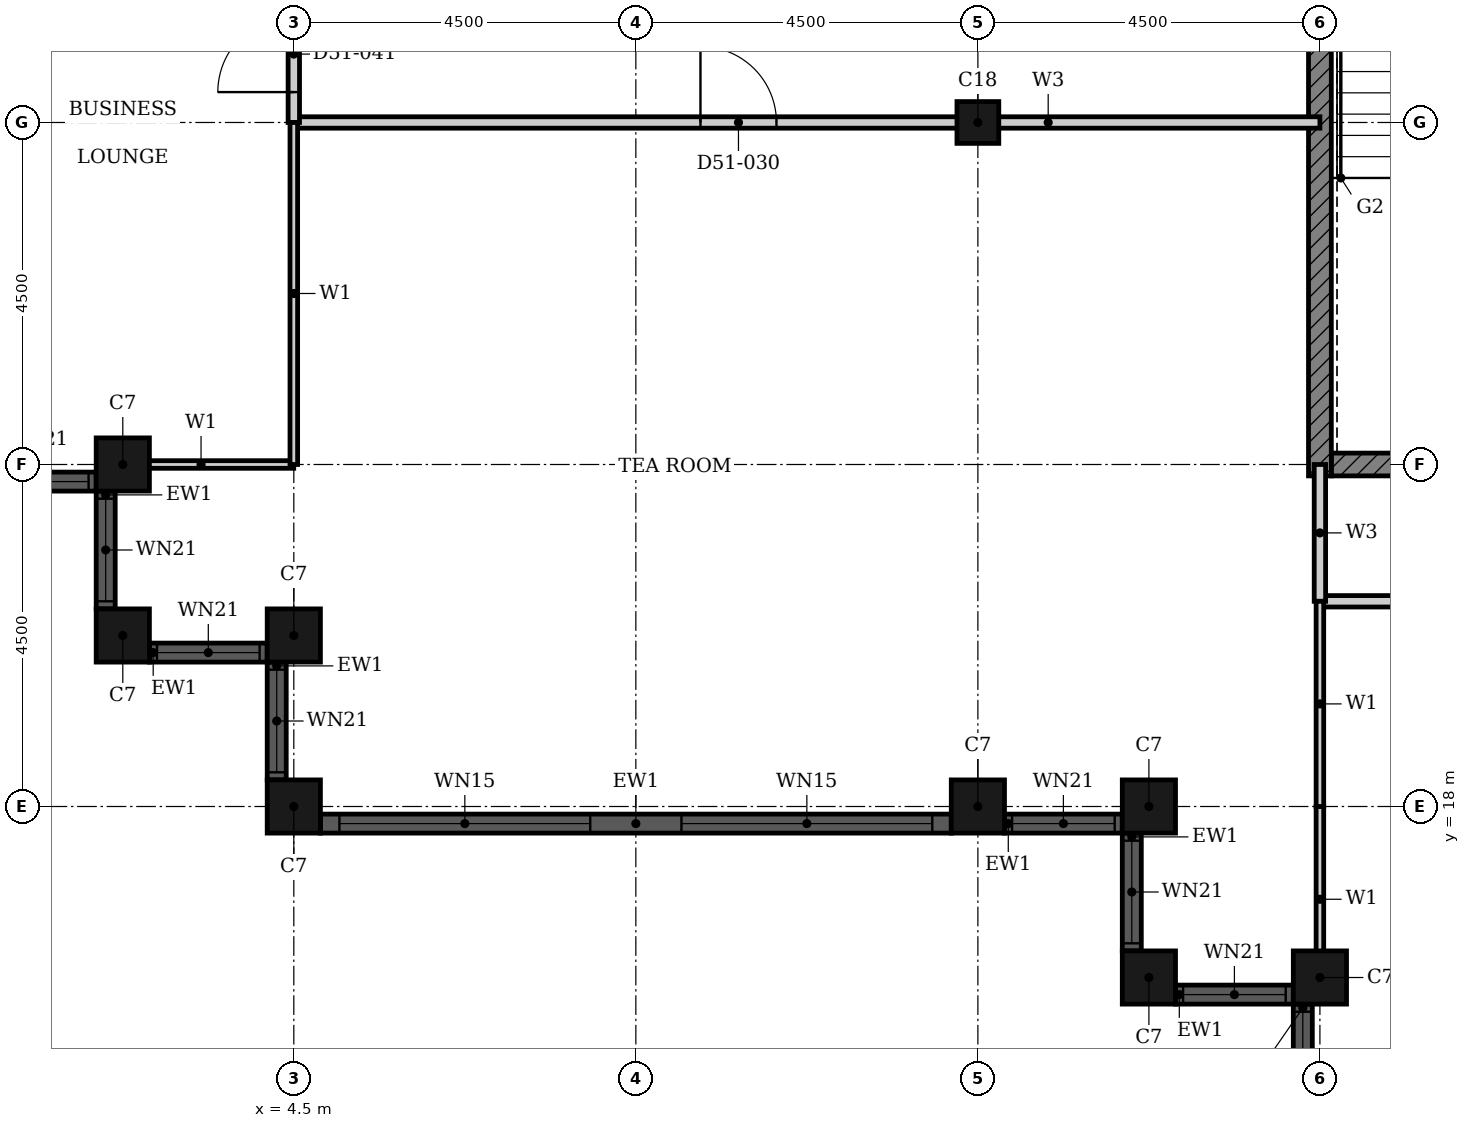
"""IFC4 building model, lengths in metres.
Left out: names, types, materials, properties, quantities, classifications, styles, units other than length and angle.
Written with IfcOpenShell. Run it as: python <this file> out.ifc"""

import sys

from ifc_helpers import new_model, si_unit, direction, frame, frame_2d, origin, origin_2d, place, context, subcontext, project, spatial, rectangle, hollow_rectangle, extrude, element, fill, save


model = new_model("IFC4")
c1 = context("Model", 3, precision=1e-05, world=origin(), true_north=direction((0.0, 1.0)))
c2 = subcontext(c1, "Body", "Model", "MODEL_VIEW")
j1 = project(units=[si_unit("LENGTHUNIT", "METRE"), si_unit("PLANEANGLEUNIT", "RADIAN")], contexts=[c1])
p1 = place(None, origin())
s1 = spatial("IfcSite", under=j1, at=p1, CompositionType="ELEMENT")
p2 = place(p1, origin())
s2 = spatial("IfcBuilding", under=s1, at=p2, CompositionType="ELEMENT")
p3 = place(p2, frame((0.0, 0.0, 203.5)))
s3 = spatial("IfcBuildingStorey", under=s2, at=p3, CompositionType="ELEMENT", Elevation=203.5)
for number, where, z_axis, x_axis in (
    (1, (2.25, 22.5, 0.0), (0.0, 0.0, 1.0), (1.0, 0.0, 0.0)),
    (2, (2.25, 20.25, 0.0), (0.0, 0.0, 1.0), (1.0, 0.0, 0.0)),
    (3, (4.5, 20.25, 0.0), (0.0, 0.0, 1.0), (1.0, 0.0, 0.0)),
    (4, (4.5, 18.0, 0.0), (0.0, 0.0, 1.0), (1.0, 0.0, 0.0)),
    (5, (13.5, 18.0, 0.0), (0.0, 0.0, 1.0), (1.0, 0.0, 0.0)),
    (6, (15.75, 18.0, 0.0), (0.0, 0.0, 1.0), (1.0, 0.0, 0.0)),
    (7, (15.75, 15.75, 0.0), (0.0, 0.0, 1.0), (1.0, 0.0, 0.0)),
    (8, (18.0, 15.75, 0.0), (0.0, 0.0, 1.0), (1.0, 0.0, 0.0)),
):
    element("IfcColumn", number, at=place(p3, frame(where, z_axis=z_axis, x_axis=x_axis)), inside=s3, PredefinedType="COLUMN", context=c2, shape_type="SweptSolid", body=[
        extrude(hollow_rectangle(XDim=0.7, YDim=0.7, WallThickness=0.022, at=origin_2d()), origin(), (0.0, 0.0, 1.0), 3.7),
    ])
p4 = place(p3, frame((13.5, 27.0, 0.0), z_axis=(0.0, 0.0, 1.0), x_axis=(1.0, 0.0, 0.0)))
e9 = element("IfcColumn", 9, at=p4, inside=s3, PredefinedType="COLUMN", context=c2, shape_type="SweptSolid", body=[
    extrude(hollow_rectangle(XDim=0.55, YDim=0.55, WallThickness=0.018, at=origin_2d()), origin(), (0.0, 0.0, 1.0), 3.7),
])
p5 = place(p3, frame((0.35, 22.275, 0.0), z_axis=(0.0, 0.0, 1.0), x_axis=(1.0, 0.0, 0.0)))
e10 = element("IfcWall", 10, at=p5, inside=s3, PredefinedType="SOLIDWALL", context=c2, shape_type="SweptSolid", body=[
    extrude(rectangle(XDim=1.55, YDim=0.25, at=frame_2d((0.775, 0.0))), origin(), (0.0, 0.0, 1.0), 3.7),
])
p6 = place(p5, frame((0.1, 0.0, 0.9)))
e11 = element("IfcOpeningElement", 11, at=p6, cuts=e10, PredefinedType="OPENING", context=c2, shape_type="SweptSolid", body=[
    extrude(rectangle(XDim=1.35, YDim=1.85, at=frame_2d((0.675, 0.925))), frame((0.0, 0.135, 0.0), z_axis=(0.0, -1.0, 0.0), x_axis=(1.0, 0.0, 0.0)), (0.0, 0.0, 1.0), 0.27),
])
p7 = place(p3, frame((2.025, 22.15, 0.0), z_axis=(0.0, 0.0, 1.0), x_axis=(0.0, -1.0, 0.0)))
e12 = element("IfcWall", 12, at=p7, inside=s3, PredefinedType="SOLIDWALL", context=c2, shape_type="SweptSolid", body=[
    extrude(rectangle(XDim=1.55, YDim=0.25, at=frame_2d((0.775, 0.0))), origin(), (0.0, 0.0, 1.0), 3.7),
])
p8 = place(p7, frame((0.1, 0.0, 0.9)))
e13 = element("IfcOpeningElement", 13, at=p8, cuts=e12, PredefinedType="OPENING", context=c2, shape_type="SweptSolid", body=[
    extrude(rectangle(XDim=1.35, YDim=1.85, at=frame_2d((0.675, 0.925))), frame((0.0, 0.135, 0.0), z_axis=(0.0, -1.0, 0.0), x_axis=(1.0, 0.0, 0.0)), (0.0, 0.0, 1.0), 0.27),
])
p9 = place(p3, frame((2.6, 20.025, 0.0), z_axis=(0.0, 0.0, 1.0), x_axis=(1.0, 0.0, 0.0)))
e14 = element("IfcWall", 14, at=p9, inside=s3, PredefinedType="SOLIDWALL", context=c2, shape_type="SweptSolid", body=[
    extrude(rectangle(XDim=1.55, YDim=0.25, at=frame_2d((0.775, 0.0))), origin(), (0.0, 0.0, 1.0), 3.7),
])
p10 = place(p9, frame((0.1, 0.0, 0.9)))
e15 = element("IfcOpeningElement", 15, at=p10, cuts=e14, PredefinedType="OPENING", context=c2, shape_type="SweptSolid", body=[
    extrude(rectangle(XDim=1.35, YDim=1.85, at=frame_2d((0.675, 0.925))), frame((0.0, 0.135, 0.0), z_axis=(0.0, -1.0, 0.0), x_axis=(1.0, 0.0, 0.0)), (0.0, 0.0, 1.0), 0.27),
])
p11 = place(p3, frame((4.275, 19.9, 0.0), z_axis=(0.0, 0.0, 1.0), x_axis=(0.0, -1.0, 0.0)))
e16 = element("IfcWall", 16, at=p11, inside=s3, PredefinedType="SOLIDWALL", context=c2, shape_type="SweptSolid", body=[
    extrude(rectangle(XDim=1.55, YDim=0.25, at=frame_2d((0.775, 0.0))), origin(), (0.0, 0.0, 1.0), 3.7),
])
p12 = place(p11, frame((0.1, 0.0, 0.9)))
e17 = element("IfcOpeningElement", 17, at=p12, cuts=e16, PredefinedType="OPENING", context=c2, shape_type="SweptSolid", body=[
    extrude(rectangle(XDim=1.35, YDim=1.85, at=frame_2d((0.675, 0.925))), frame((0.0, 0.135, 0.0), z_axis=(0.0, -1.0, 0.0), x_axis=(1.0, 0.0, 0.0)), (0.0, 0.0, 1.0), 0.27),
])
p13 = place(p3, frame((4.85, 17.775, 0.0), z_axis=(0.0, 0.0, 1.0), x_axis=(1.0, 0.0, 0.0)))
e18 = element("IfcWall", 18, at=p13, inside=s3, PredefinedType="SOLIDWALL", context=c2, shape_type="SweptSolid", body=[
    extrude(rectangle(XDim=8.3, YDim=0.25, at=frame_2d((4.15, 0.0))), origin(), (0.0, 0.0, 1.0), 3.7),
])
p14 = place(p13, frame((0.25, 0.0, 0.45)))
e19 = element("IfcOpeningElement", 19, at=p14, cuts=e18, PredefinedType="OPENING", context=c2, shape_type="SweptSolid", body=[
    extrude(rectangle(XDim=3.3, YDim=2.3, at=frame_2d((1.65, 1.15))), frame((0.0, 0.135, 0.0), z_axis=(0.0, -1.0, 0.0), x_axis=(1.0, 0.0, 0.0)), (0.0, 0.0, 1.0), 0.27),
])
p15 = place(p13, frame((4.75, 0.0, 0.45)))
e20 = element("IfcOpeningElement", 20, at=p15, cuts=e18, PredefinedType="OPENING", context=c2, shape_type="SweptSolid", body=[
    extrude(rectangle(XDim=3.3, YDim=2.3, at=frame_2d((1.65, 1.15))), frame((0.0, 0.135, 0.0), z_axis=(0.0, -1.0, 0.0), x_axis=(1.0, 0.0, 0.0)), (0.0, 0.0, 1.0), 0.27),
])
p16 = place(p3, frame((13.85, 17.775, 0.0), z_axis=(0.0, 0.0, 1.0), x_axis=(1.0, 0.0, 0.0)))
e21 = element("IfcWall", 21, at=p16, inside=s3, PredefinedType="SOLIDWALL", context=c2, shape_type="SweptSolid", body=[
    extrude(rectangle(XDim=1.55, YDim=0.25, at=frame_2d((0.775, 0.0))), origin(), (0.0, 0.0, 1.0), 3.7),
])
p17 = place(p16, frame((0.1, 0.0, 0.9)))
e22 = element("IfcOpeningElement", 22, at=p17, cuts=e21, PredefinedType="OPENING", context=c2, shape_type="SweptSolid", body=[
    extrude(rectangle(XDim=1.35, YDim=1.85, at=frame_2d((0.675, 0.925))), frame((0.0, 0.135, 0.0), z_axis=(0.0, -1.0, 0.0), x_axis=(1.0, 0.0, 0.0)), (0.0, 0.0, 1.0), 0.27),
])
p18 = place(p3, frame((15.525, 17.65, 0.0), z_axis=(0.0, 0.0, 1.0), x_axis=(0.0, -1.0, 0.0)))
e23 = element("IfcWall", 23, at=p18, inside=s3, PredefinedType="SOLIDWALL", context=c2, shape_type="SweptSolid", body=[
    extrude(rectangle(XDim=1.55, YDim=0.25, at=frame_2d((0.775, 0.0))), origin(), (0.0, 0.0, 1.0), 3.7),
])
p19 = place(p18, frame((0.1, 0.0, 0.9)))
e24 = element("IfcOpeningElement", 24, at=p19, cuts=e23, PredefinedType="OPENING", context=c2, shape_type="SweptSolid", body=[
    extrude(rectangle(XDim=1.35, YDim=1.85, at=frame_2d((0.675, 0.925))), frame((0.0, 0.135, 0.0), z_axis=(0.0, -1.0, 0.0), x_axis=(1.0, 0.0, 0.0)), (0.0, 0.0, 1.0), 0.27),
])
p20 = place(p3, frame((16.1, 15.525, 0.0), z_axis=(0.0, 0.0, 1.0), x_axis=(1.0, 0.0, 0.0)))
e25 = element("IfcWall", 25, at=p20, inside=s3, PredefinedType="SOLIDWALL", context=c2, shape_type="SweptSolid", body=[
    extrude(rectangle(XDim=1.55, YDim=0.25, at=frame_2d((0.775, 0.0))), origin(), (0.0, 0.0, 1.0), 3.7),
])
p21 = place(p20, frame((0.1, 0.0, 0.9)))
e26 = element("IfcOpeningElement", 26, at=p21, cuts=e25, PredefinedType="OPENING", context=c2, shape_type="SweptSolid", body=[
    extrude(rectangle(XDim=1.35, YDim=1.85, at=frame_2d((0.675, 0.925))), frame((0.0, 0.135, 0.0), z_axis=(0.0, -1.0, 0.0), x_axis=(1.0, 0.0, 0.0)), (0.0, 0.0, 1.0), 0.27),
])
p22 = place(p3, frame((17.775, 15.4, 0.0), z_axis=(0.0, 0.0, 1.0), x_axis=(0.0, -1.0, 0.0)))
e27 = element("IfcWall", 27, at=p22, inside=s3, PredefinedType="SOLIDWALL", context=c2, shape_type="SweptSolid", body=[
    extrude(rectangle(XDim=1.55, YDim=0.25, at=frame_2d((0.775, 0.0))), origin(), (0.0, 0.0, 1.0), 3.7),
])
p23 = place(p22, frame((0.1, 0.0, 0.9)))
e28 = element("IfcOpeningElement", 28, at=p23, cuts=e27, PredefinedType="OPENING", context=c2, shape_type="SweptSolid", body=[
    extrude(rectangle(XDim=1.35, YDim=1.85, at=frame_2d((0.675, 0.925))), frame((0.0, 0.135, 0.0), z_axis=(0.0, -1.0, 0.0), x_axis=(1.0, 0.0, 0.0)), (0.0, 0.0, 1.0), 0.27),
])
p24 = place(p3, frame((18.15, 22.5, 0.0), z_axis=(0.0, 0.0, 1.0), x_axis=(1.0, 0.0, 0.0)))
e29 = element("IfcWall", 29, at=p24, inside=s3, PredefinedType="SHEAR", context=c2, shape_type="SweptSolid", body=[
    extrude(rectangle(XDim=4.225, YDim=0.3, at=frame_2d((2.113, 0.0))), origin(), (0.0, 0.0, 1.0), 3.4),
])
p25 = place(p3, frame((18.0, 22.35, 0.0), z_axis=(0.0, 0.0, 1.0), x_axis=(0.0, 1.0, 0.0)))
e30 = element("IfcWall", 30, at=p25, inside=s3, PredefinedType="SHEAR", context=c2, shape_type="SweptSolid", body=[
    extrude(rectangle(XDim=9.3, YDim=0.3, at=frame_2d((4.65, 0.0))), origin(), (0.0, 0.0, 1.0), 3.4),
])
p26 = place(p3, frame((18.0, 20.7, 0.0), z_axis=(0.0, 0.0, 1.0), x_axis=(1.0, 0.0, 0.0)))
e31 = element("IfcWall", 31, at=p26, inside=s3, PredefinedType="PARTITIONING", context=c2, shape_type="SweptSolid", body=[
    extrude(rectangle(XDim=13.5, YDim=0.15, at=frame_2d((6.75, 0.0))), origin(), (0.0, 0.0, 1.0), 3.4),
])
p27 = place(p26, frame((6.25, 0.0, 0.0)))
e32 = element("IfcOpeningElement", 32, at=p27, cuts=e31, PredefinedType="OPENING", context=c2, shape_type="SweptSolid", body=[
    extrude(rectangle(XDim=1.0, YDim=2.1, at=frame_2d((0.5, 1.05))), frame((0.0, 0.085, 0.0), z_axis=(0.0, -1.0, 0.0), x_axis=(1.0, 0.0, 0.0)), (0.0, 0.0, 1.0), 0.17),
])
p28 = place(p3, frame((4.5, 27.0, 0.0), z_axis=(0.0, 0.0, 1.0), x_axis=(1.0, 0.0, 0.0)))
e33 = element("IfcWall", 33, at=p28, inside=s3, PredefinedType="PARTITIONING", context=c2, shape_type="SweptSolid", body=[
    extrude(rectangle(XDim=13.5, YDim=0.15, at=frame_2d((6.75, 0.0))), origin(), (0.0, 0.0, 1.0), 2.68),
])
p29 = place(p28, frame((5.35, 0.0, 0.0)))
e34 = element("IfcOpeningElement", 34, at=p29, cuts=e33, PredefinedType="OPENING", context=c2, shape_type="SweptSolid", body=[
    extrude(rectangle(XDim=1.0, YDim=2.1, at=frame_2d((0.5, 1.05))), frame((0.0, 0.085, 0.0), z_axis=(0.0, -1.0, 0.0), x_axis=(1.0, 0.0, 0.0)), (0.0, 0.0, 1.0), 0.17),
])
p30 = place(p3, frame((18.0, 20.7, 0.0), z_axis=(0.0, 0.0, 1.0), x_axis=(0.0, 1.0, 0.0)))
e35 = element("IfcWall", 35, at=p30, inside=s3, PredefinedType="PARTITIONING", context=c2, shape_type="SweptSolid", body=[
    extrude(rectangle(XDim=1.8, YDim=0.15, at=frame_2d((0.9, 0.0))), origin(), (0.0, 0.0, 1.0), 3.4),
])
p31 = place(p3, frame((4.5, 27.0, 0.0), z_axis=(0.0, 0.0, 1.0), x_axis=(0.0, 1.0, 0.0)))
e36 = element("IfcWall", 36, at=p31, inside=s3, PredefinedType="PARTITIONING", context=c2, shape_type="SweptSolid", body=[
    extrude(rectangle(XDim=1.8, YDim=0.15, at=frame_2d((0.9, 0.0))), origin(), (0.0, 0.0, 1.0), 3.4),
])
p32 = place(p31, frame((0.4, 0.0, 0.0)))
e37 = element("IfcOpeningElement", 37, at=p32, cuts=e36, PredefinedType="OPENING", context=c2, shape_type="SweptSolid", body=[
    extrude(rectangle(XDim=1.0, YDim=2.1, at=frame_2d((0.5, 1.05))), frame((0.0, 0.085, 0.0), z_axis=(0.0, -1.0, 0.0), x_axis=(1.0, 0.0, 0.0)), (0.0, 0.0, 1.0), 0.17),
])
p33 = place(p3, frame((2.06, 22.5, 0.0), z_axis=(0.0, 0.0, 1.0), x_axis=(1.0, 0.0, 0.0)))
e38 = element("IfcWall", 38, at=p33, inside=s3, PredefinedType="PARTITIONING", context=c2, shape_type="SweptSolid", body=[
    extrude(rectangle(XDim=2.439, YDim=0.1, at=frame_2d((1.219, 0.0))), origin(), (0.0, 0.0, 1.0), 2.68),
])
p34 = place(p3, frame((18.0, 15.56, 0.0), z_axis=(0.0, 0.0, 1.0), x_axis=(0.0, 1.0, 0.0)))
e39 = element("IfcWall", 39, at=p34, inside=s3, PredefinedType="PARTITIONING", context=c2, shape_type="SweptSolid", body=[
    extrude(rectangle(XDim=2.439, YDim=0.1, at=frame_2d((1.219, 0.0))), origin(), (0.0, 0.0, 1.0), 3.4),
])
p35 = place(p3, frame((18.0, 18.0, 0.0), z_axis=(0.0, 0.0, 1.0), x_axis=(0.0, 1.0, 0.0)))
e40 = element("IfcWall", 40, at=p35, inside=s3, PredefinedType="PARTITIONING", context=c2, shape_type="SweptSolid", body=[
    extrude(rectangle(XDim=2.7, YDim=0.1, at=frame_2d((1.35, 0.0))), origin(), (0.0, 0.0, 1.0), 3.4),
])
p36 = place(p3, frame((4.5, 22.5, 0.0), z_axis=(0.0, 0.0, 1.0), x_axis=(0.0, 1.0, 0.0)))
e41 = element("IfcWall", 41, at=p36, inside=s3, PredefinedType="PARTITIONING", context=c2, shape_type="SweptSolid", body=[
    extrude(rectangle(XDim=4.5, YDim=0.1, at=frame_2d((2.25, 0.0))), origin(), (0.0, 0.0, 1.0), 3.4),
])
p37 = place(p6, origin())
e42 = element("IfcWindow", 42, at=p37, inside=s3, PartitioningType="SINGLE_PANEL", PredefinedType="WINDOW", context=c2, shape_type="SweptSolid", body=[
    extrude(rectangle(XDim=1.35, YDim=1.85, at=frame_2d((0.675, 0.925))), frame((0.0, 0.03, 0.0), z_axis=(0.0, -1.0, 0.0), x_axis=(1.0, 0.0, 0.0)), (0.0, 0.0, 1.0), 0.06),
])
fill(e11, e42)
p38 = place(p8, origin())
e43 = element("IfcWindow", 43, at=p38, inside=s3, PartitioningType="SINGLE_PANEL", PredefinedType="WINDOW", context=c2, shape_type="SweptSolid", body=[
    extrude(rectangle(XDim=1.35, YDim=1.85, at=frame_2d((0.675, 0.925))), frame((0.0, 0.03, 0.0), z_axis=(0.0, -1.0, 0.0), x_axis=(1.0, 0.0, 0.0)), (0.0, 0.0, 1.0), 0.06),
])
fill(e13, e43)
p39 = place(p10, origin())
e44 = element("IfcWindow", 44, at=p39, inside=s3, PartitioningType="SINGLE_PANEL", PredefinedType="WINDOW", context=c2, shape_type="SweptSolid", body=[
    extrude(rectangle(XDim=1.35, YDim=1.85, at=frame_2d((0.675, 0.925))), frame((0.0, 0.03, 0.0), z_axis=(0.0, -1.0, 0.0), x_axis=(1.0, 0.0, 0.0)), (0.0, 0.0, 1.0), 0.06),
])
fill(e15, e44)
p40 = place(p12, origin())
e45 = element("IfcWindow", 45, at=p40, inside=s3, PartitioningType="SINGLE_PANEL", PredefinedType="WINDOW", context=c2, shape_type="SweptSolid", body=[
    extrude(rectangle(XDim=1.35, YDim=1.85, at=frame_2d((0.675, 0.925))), frame((0.0, 0.03, 0.0), z_axis=(0.0, -1.0, 0.0), x_axis=(1.0, 0.0, 0.0)), (0.0, 0.0, 1.0), 0.06),
])
fill(e17, e45)
p41 = place(p14, origin())
e46 = element("IfcWindow", 46, at=p41, inside=s3, PartitioningType="SINGLE_PANEL", PredefinedType="WINDOW", context=c2, shape_type="SweptSolid", body=[
    extrude(rectangle(XDim=3.3, YDim=2.3, at=frame_2d((1.65, 1.15))), frame((0.0, 0.03, 0.0), z_axis=(0.0, -1.0, 0.0), x_axis=(1.0, 0.0, 0.0)), (0.0, 0.0, 1.0), 0.06),
])
fill(e19, e46)
p42 = place(p15, origin())
e47 = element("IfcWindow", 47, at=p42, inside=s3, PartitioningType="SINGLE_PANEL", PredefinedType="WINDOW", context=c2, shape_type="SweptSolid", body=[
    extrude(rectangle(XDim=3.3, YDim=2.3, at=frame_2d((1.65, 1.15))), frame((0.0, 0.03, 0.0), z_axis=(0.0, -1.0, 0.0), x_axis=(1.0, 0.0, 0.0)), (0.0, 0.0, 1.0), 0.06),
])
fill(e20, e47)
p43 = place(p17, origin())
e48 = element("IfcWindow", 48, at=p43, inside=s3, PartitioningType="SINGLE_PANEL", PredefinedType="WINDOW", context=c2, shape_type="SweptSolid", body=[
    extrude(rectangle(XDim=1.35, YDim=1.85, at=frame_2d((0.675, 0.925))), frame((0.0, 0.03, 0.0), z_axis=(0.0, -1.0, 0.0), x_axis=(1.0, 0.0, 0.0)), (0.0, 0.0, 1.0), 0.06),
])
fill(e22, e48)
p44 = place(p19, origin())
e49 = element("IfcWindow", 49, at=p44, inside=s3, PartitioningType="SINGLE_PANEL", PredefinedType="WINDOW", context=c2, shape_type="SweptSolid", body=[
    extrude(rectangle(XDim=1.35, YDim=1.85, at=frame_2d((0.675, 0.925))), frame((0.0, 0.03, 0.0), z_axis=(0.0, -1.0, 0.0), x_axis=(1.0, 0.0, 0.0)), (0.0, 0.0, 1.0), 0.06),
])
fill(e24, e49)
p45 = place(p21, origin())
e50 = element("IfcWindow", 50, at=p45, inside=s3, PartitioningType="SINGLE_PANEL", PredefinedType="WINDOW", context=c2, shape_type="SweptSolid", body=[
    extrude(rectangle(XDim=1.35, YDim=1.85, at=frame_2d((0.675, 0.925))), frame((0.0, 0.03, 0.0), z_axis=(0.0, -1.0, 0.0), x_axis=(1.0, 0.0, 0.0)), (0.0, 0.0, 1.0), 0.06),
])
fill(e26, e50)
p46 = place(p23, origin())
e51 = element("IfcWindow", 51, at=p46, inside=s3, PartitioningType="SINGLE_PANEL", PredefinedType="WINDOW", context=c2, shape_type="SweptSolid", body=[
    extrude(rectangle(XDim=1.35, YDim=1.85, at=frame_2d((0.675, 0.925))), frame((0.0, 0.03, 0.0), z_axis=(0.0, -1.0, 0.0), x_axis=(1.0, 0.0, 0.0)), (0.0, 0.0, 1.0), 0.06),
])
fill(e28, e51)
p47 = place(p29, origin())
e52 = element("IfcDoor", 52, at=p47, inside=s3, OperationType="SINGLE_SWING_LEFT", PredefinedType="DOOR", context=c2, shape_type="SweptSolid", body=[
    extrude(rectangle(XDim=1.0, YDim=2.1, at=frame_2d((0.5, 1.05))), frame((0.0, 0.025, 0.0), z_axis=(0.0, -1.0, 0.0), x_axis=(1.0, 0.0, 0.0)), (0.0, 0.0, 1.0), 0.05),
])
fill(e34, e52)
p48 = place(p32, origin())
e53 = element("IfcDoor", 53, at=p48, inside=s3, OperationType="SINGLE_SWING_LEFT", PredefinedType="DOOR", context=c2, shape_type="SweptSolid", body=[
    extrude(rectangle(XDim=1.0, YDim=2.1, at=frame_2d((0.5, 1.05))), frame((0.0, 0.025, 0.0), z_axis=(0.0, -1.0, 0.0), x_axis=(1.0, 0.0, 0.0)), (0.0, 0.0, 1.0), 0.05),
])
fill(e37, e53)
save(model, sys.argv[1])
